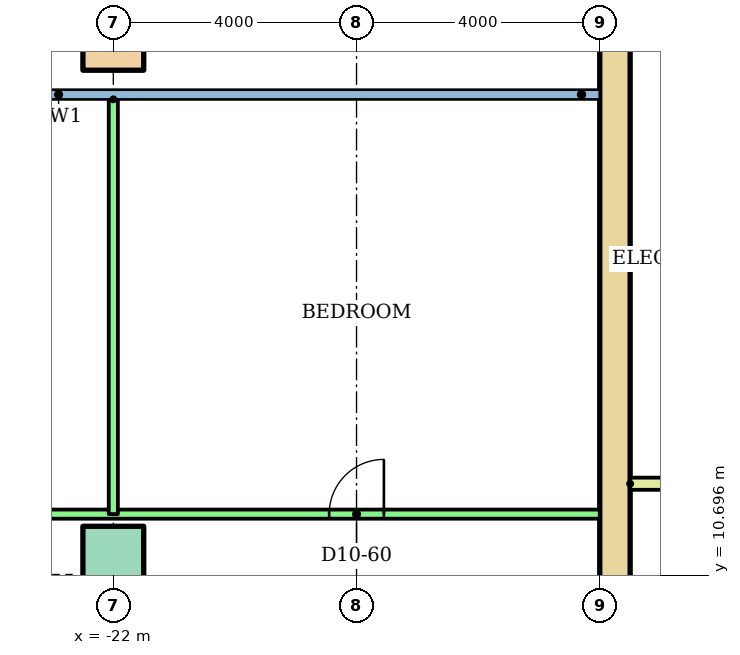
"""IFC4 building model, lengths in metres.
Left out: names, types, materials, properties, quantities, classifications, styles, units other than length and angle.
Written with IfcOpenShell. Run it as: python <this file> out.ifc"""

import sys

from ifc_helpers import new_model, si_unit, direction, frame, frame_2d, origin, origin_2d, place, context, subcontext, project, spatial, rectangle, hollow_rectangle, extrude, element, fill, save


model = new_model("IFC4")
c1 = context("Model", 3, precision=1e-05, world=origin(), true_north=direction((0.0, 1.0)))
c2 = subcontext(c1, "Body", "Model", "MODEL_VIEW")
j1 = project(units=[si_unit("LENGTHUNIT", "METRE"), si_unit("PLANEANGLEUNIT", "RADIAN")], contexts=[c1])
p1 = place(None, origin())
s1 = spatial("IfcSite", under=j1, at=p1, CompositionType="ELEMENT")
p2 = place(p1, origin())
s2 = spatial("IfcBuilding", under=s1, at=p2, CompositionType="ELEMENT")
p3 = place(p2, frame((0.0, 0.0, 41.6)))
s3 = spatial("IfcBuildingStorey", under=s2, at=p3, CompositionType="ELEMENT", Elevation=41.6)
p4 = place(p3, frame((-22.0, 11.0, 0.0)))
e1 = element("IfcColumn", 1, at=p4, inside=s3, PredefinedType="COLUMN", context=c2, shape_type="SweptSolid", body=[
    extrude(rectangle(XDim=1.0, YDim=1.0, at=origin_2d()), origin(), (0.0, 0.0, 1.0), 3.2),
])
p5 = place(p3, frame((-22.0, 19.5, 0.0)))
e2 = element("IfcColumn", 2, at=p5, inside=s3, PredefinedType="COLUMN", context=c2, shape_type="SweptSolid", body=[
    extrude(hollow_rectangle(XDim=1.0, YDim=1.0, WallThickness=0.05, at=origin_2d()), origin(), (0.0, 0.0, 1.0), 3.2),
])
p6 = place(p3, frame((-13.75, 3.0, 0.0), z_axis=(0.0, 0.0, 1.0), x_axis=(0.0, 1.0, 0.0)))
e3 = element("IfcWall", 3, at=p6, inside=s3, PredefinedType="SHEAR", context=c2, shape_type="SweptSolid", body=[
    extrude(rectangle(XDim=17.0, YDim=0.5, at=frame_2d((8.5, 0.0))), origin(), (0.0, 0.0, 1.0), 2.92),
])
p7 = place(p3, frame((-13.5, 12.2, 0.0)))
e4 = element("IfcWall", 4, at=p7, inside=s3, PredefinedType="PARTITIONING", context=c2, shape_type="SweptSolid", body=[
    extrude(rectangle(XDim=3.9, YDim=0.2, at=frame_2d((1.95, 0.0))), origin(), (0.0, 0.0, 1.0), 2.92),
])
p8 = place(p3, frame((-36.52, 11.7, 0.0)))
e5 = element("IfcWall", 5, at=p8, inside=s3, PredefinedType="PARTITIONING", context=c2, shape_type="SweptSolid", body=[
    extrude(rectangle(XDim=22.52, YDim=0.15, at=frame_2d((11.26, 0.0))), origin(), (0.0, 0.0, 1.0), 2.4),
])
p9 = place(p8, frame((1.97, 0.0, 0.0)))
e6 = element("IfcOpeningElement", 6, at=p9, cuts=e5, PredefinedType="OPENING", context=c2, shape_type="SweptSolid", body=[
    extrude(rectangle(XDim=1.0, YDim=2.1, at=frame_2d((0.5, 1.05))), frame((0.0, 0.085, 0.0), z_axis=(0.0, -1.0, 0.0), x_axis=(1.0, 0.0, 0.0)), (0.0, 0.0, 1.0), 0.17),
])
p10 = place(p8, frame((9.17, 0.0, 0.0)))
e7 = element("IfcOpeningElement", 7, at=p10, cuts=e5, PredefinedType="OPENING", context=c2, shape_type="SweptSolid", body=[
    extrude(rectangle(XDim=0.9, YDim=2.1, at=frame_2d((0.45, 1.05))), frame((0.0, 0.085, 0.0), z_axis=(0.0, -1.0, 0.0), x_axis=(1.0, 0.0, 0.0)), (0.0, 0.0, 1.0), 0.17),
])
p11 = place(p8, frame((18.07, 0.0, 0.0)))
e8 = element("IfcOpeningElement", 8, at=p11, cuts=e5, PredefinedType="OPENING", context=c2, shape_type="SweptSolid", body=[
    extrude(rectangle(XDim=0.9, YDim=2.1, at=frame_2d((0.45, 1.05))), frame((0.0, 0.085, 0.0), z_axis=(0.0, -1.0, 0.0), x_axis=(1.0, 0.0, 0.0)), (0.0, 0.0, 1.0), 0.17),
])
p12 = place(p3, frame((-22.0, 18.521, 0.0), z_axis=(0.0, 0.0, 1.0), x_axis=(0.0, -1.0, 0.0)))
e9 = element("IfcWall", 9, at=p12, inside=s3, PredefinedType="PARTITIONING", context=c2, shape_type="SweptSolid", body=[
    extrude(rectangle(XDim=6.821, YDim=0.15, at=frame_2d((3.411, 0.0))), origin(), (0.0, 0.0, 1.0), 2.4),
])
p13 = place(p11, origin())
e10 = element("IfcDoor", 10, at=p13, inside=s3, OperationType="SINGLE_SWING_RIGHT", PredefinedType="DOOR", context=c2, shape_type="SweptSolid", body=[
    extrude(rectangle(XDim=0.9, YDim=2.1, at=frame_2d((0.45, 1.05))), frame((0.0, 0.025, 0.0), z_axis=(0.0, -1.0, 0.0), x_axis=(1.0, 0.0, 0.0)), (0.0, 0.0, 1.0), 0.05),
])
fill(e8, e10)
save(model, sys.argv[1])
